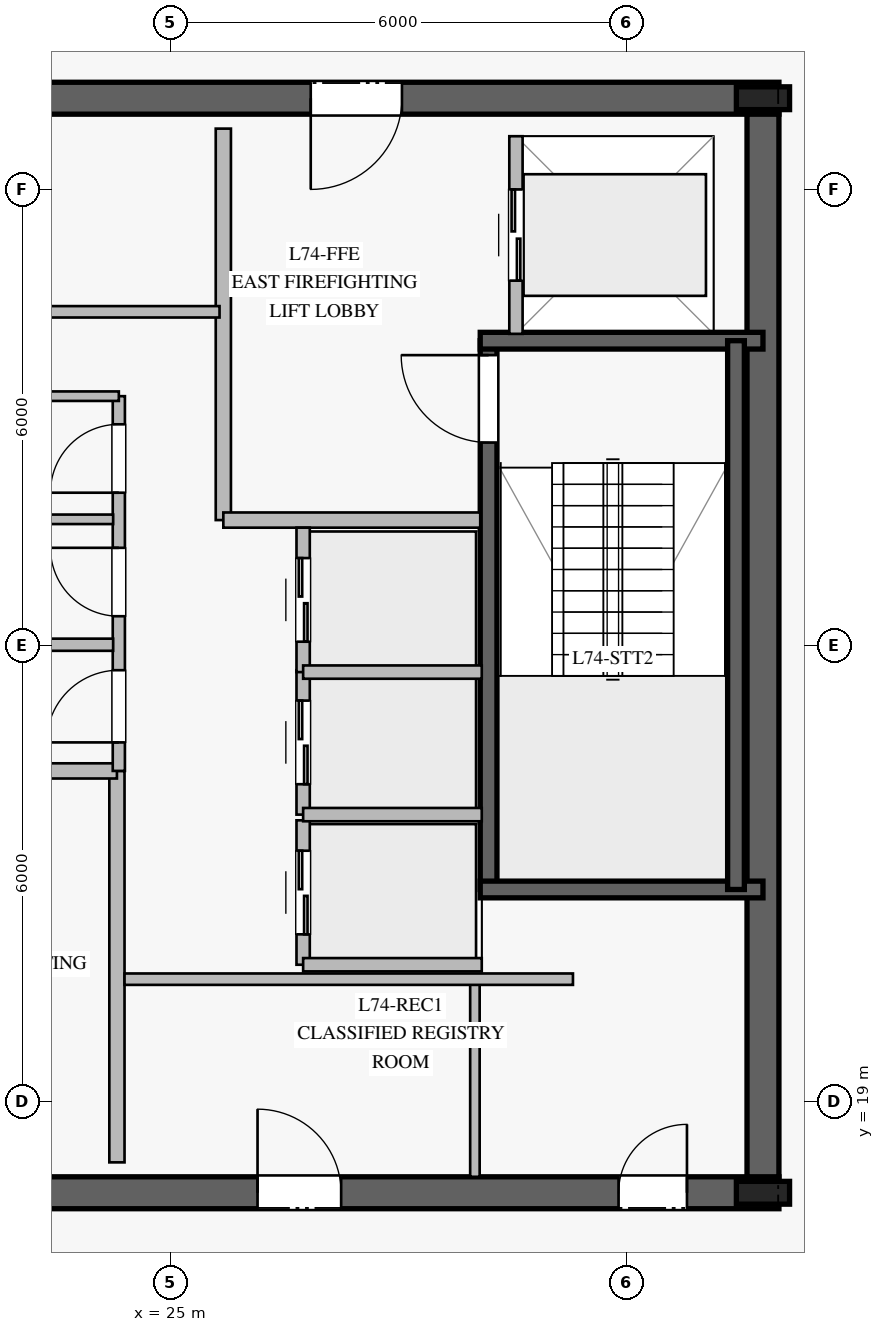
"""IFC4 building model, lengths in metres.
Left out: names, types, materials, properties, quantities, classifications, styles, units other than length and angle.
Written with IfcOpenShell. Run it as: python <this file> out.ifc"""

import sys

from ifc_helpers import new_model, si_unit, direction, frame, frame_2d, origin, origin_2d, place, context, subcontext, project, spatial, rectangle, i_section, extrude, element, fill, save


model = new_model("IFC4")
c1 = context("Model", 3, precision=1e-05, world=origin(), true_north=direction((0.0, 1.0)))
c2 = subcontext(c1, "Body", "Model", "MODEL_VIEW")
j1 = project(units=[si_unit("LENGTHUNIT", "METRE"), si_unit("PLANEANGLEUNIT", "RADIAN")], contexts=[c1])
p1 = place(None, origin())
s1 = spatial("IfcSite", under=j1, at=p1, CompositionType="ELEMENT")
p2 = place(p1, origin())
s2 = spatial("IfcBuilding", under=s1, at=p2, CompositionType="ELEMENT")
p3 = place(p2, frame((0.0, 0.0, 306.2)))
s3 = spatial("IfcBuildingStorey", under=s2, at=p3, CompositionType="ELEMENT", Elevation=306.2)
p4 = place(p3, frame((16.99, 17.8, 0.0), z_axis=(0.0, 0.0, 1.0), x_axis=(1.0, 0.0, 0.0)))
e1 = element("IfcWall", 1, at=p4, inside=s3, PredefinedType="SHEAR", context=c2, shape_type="SweptSolid", body=[
    extrude(rectangle(XDim=16.02, YDim=0.42, at=frame_2d((8.01, 0.0))), origin(), (0.0, 0.0, 1.0), 3.78),
])
p5 = place(p4, frame((4.96, 0.0, 0.0)))
e2 = element("IfcOpeningElement", 2, at=p5, cuts=e1, PredefinedType="OPENING", context=c2, shape_type="SweptSolid", body=[
    extrude(rectangle(XDim=1.2, YDim=2.25, at=frame_2d((0.6, 1.125))), frame((0.0, 0.22, 0.0), z_axis=(0.0, -1.0, 0.0), x_axis=(1.0, 0.0, 0.0)), (0.0, 0.0, 1.0), 0.44),
])
p6 = place(p4, frame((13.91, 0.0, 0.0)))
e3 = element("IfcOpeningElement", 3, at=p6, cuts=e1, PredefinedType="OPENING", context=c2, shape_type="SweptSolid", body=[
    extrude(rectangle(XDim=0.9, YDim=2.1, at=frame_2d((0.45, 1.05))), frame((0.0, 0.22, 0.0), z_axis=(0.0, -1.0, 0.0), x_axis=(1.0, 0.0, 0.0)), (0.0, 0.0, 1.0), 0.44),
])
p7 = place(p4, frame((9.16, 0.0, 0.0)))
e4 = element("IfcOpeningElement", 4, at=p7, cuts=e1, PredefinedType="OPENING", context=c2, shape_type="SweptSolid", body=[
    extrude(rectangle(XDim=1.1, YDim=2.2, at=frame_2d((0.55, 1.1))), frame((0.0, 0.22, 0.0), z_axis=(0.0, -1.0, 0.0), x_axis=(1.0, 0.0, 0.0)), (0.0, 0.0, 1.0), 0.44),
])
p8 = place(p3, frame((33.01, 32.2, 0.0), z_axis=(0.0, 0.0, 1.0), x_axis=(-1.0, 0.0, 0.0)))
e5 = element("IfcWall", 5, at=p8, inside=s3, PredefinedType="SHEAR", context=c2, shape_type="SweptSolid", body=[
    extrude(rectangle(XDim=16.02, YDim=0.42, at=frame_2d((8.01, 0.0))), origin(), (0.0, 0.0, 1.0), 3.78),
])
p9 = place(p8, frame((4.96, 0.0, 0.0)))
e6 = element("IfcOpeningElement", 6, at=p9, cuts=e5, PredefinedType="OPENING", context=c2, shape_type="SweptSolid", body=[
    extrude(rectangle(XDim=1.2, YDim=2.25, at=frame_2d((0.6, 1.125))), frame((0.0, 0.22, 0.0), z_axis=(0.0, -1.0, 0.0), x_axis=(1.0, 0.0, 0.0)), (0.0, 0.0, 1.0), 0.44),
])
p10 = place(p8, frame((9.785, 0.0, 0.0)))
e7 = element("IfcOpeningElement", 7, at=p10, cuts=e5, PredefinedType="OPENING", context=c2, shape_type="SweptSolid", body=[
    extrude(rectangle(XDim=1.1, YDim=2.2, at=frame_2d((0.55, 1.1))), frame((0.0, 0.22, 0.0), z_axis=(0.0, -1.0, 0.0), x_axis=(1.0, 0.0, 0.0)), (0.0, 0.0, 1.0), 0.44),
])
p11 = place(p3, frame((32.8, 18.01, 0.0), z_axis=(0.0, 0.0, 1.0), x_axis=(0.0, 1.0, 0.0)))
e8 = element("IfcWall", 8, at=p11, inside=s3, PredefinedType="SHEAR", context=c2, shape_type="SweptSolid", body=[
    extrude(rectangle(XDim=13.98, YDim=0.42, at=frame_2d((6.99, 0.0))), origin(), (0.0, 0.0, 1.0), 3.78),
])
for number, where, z_axis, x_axis in (
    (9, (32.8, 17.8, 0.0), (0.0, 0.0, 1.0), (1.0, 0.0, 0.0)),
    (10, (32.8, 32.2, 0.0), (0.0, 0.0, 1.0), (1.0, 0.0, 0.0)),
):
    element("IfcColumn", number, at=place(p3, frame(where, z_axis=z_axis, x_axis=x_axis)), inside=s3, PredefinedType="COLUMN", context=c2, shape_type="SweptSolid", body=[
        extrude(i_section(OverallWidth=0.3, OverallDepth=0.7, WebThickness=0.017, FlangeThickness=0.032, at=origin_2d()), origin(), (0.0, 0.0, 1.0), 4.0),
    ])
p12 = place(p3, frame((29.19, 21.79, 0.0), z_axis=(0.0, 0.0, 1.0), x_axis=(0.0, 1.0, 0.0)))
e11 = element("IfcWall", 11, at=p12, inside=s3, PredefinedType="SOLIDWALL", context=c2, shape_type="SweptSolid", body=[
    extrude(rectangle(XDim=7.22, YDim=0.22, at=frame_2d((3.61, 0.0))), origin(), (0.0, 0.0, 1.0), 3.78),
])
p13 = place(p12, frame((5.88, 0.0, 0.0)))
e12 = element("IfcOpeningElement", 12, at=p13, cuts=e11, PredefinedType="OPENING", context=c2, shape_type="SweptSolid", body=[
    extrude(rectangle(XDim=1.15, YDim=2.2, at=frame_2d((0.575, 1.1))), frame((0.0, 0.12, 0.0), z_axis=(0.0, -1.0, 0.0), x_axis=(1.0, 0.0, 0.0)), (0.0, 0.0, 1.0), 0.24),
])
for number, where, z_axis, x_axis in (
    (13, (29.08, 21.79, 0.0), (0.0, 0.0, 1.0), (1.0, 0.0, 0.0)),
    (14, (29.08, 29.01, 0.0), (0.0, 0.0, 1.0), (1.0, 0.0, 0.0)),
):
    element("IfcWall", number, at=place(p3, frame(where, z_axis=z_axis, x_axis=x_axis)), inside=s3, PredefinedType="SOLIDWALL", context=c2, shape_type="SweptSolid", body=[
        extrude(rectangle(XDim=3.72, YDim=0.22, at=frame_2d((1.86, 0.0))), origin(), (0.0, 0.0, 1.0), 3.78),
    ])
p14 = place(p3, frame((32.445, 29.01, 0.0), z_axis=(0.0, 0.0, 1.0), x_axis=(0.0, -1.0, 0.0)))
e15 = element("IfcWall", 15, at=p14, inside=s3, PredefinedType="SOLIDWALL", context=c2, shape_type="SweptSolid", body=[
    extrude(rectangle(XDim=7.22, YDim=0.22, at=frame_2d((3.61, 0.0))), origin(), (0.0, 0.0, 1.0), 3.78),
])
p15 = place(p3, frame((24.3, 18.2, 0.0), z_axis=(0.0, 0.0, 1.0), x_axis=(0.0, 1.0, 0.0)))
e16 = element("IfcWall", 16, at=p15, inside=s3, PredefinedType="PARTITIONING", context=c2, shape_type="SweptSolid", body=[
    extrude(rectangle(XDim=5.15, YDim=0.2, at=frame_2d((2.575, 0.0))), origin(), (0.0, 0.0, 1.0), 3.78),
])
p16 = place(p3, frame((20.92, 23.35, 0.0), z_axis=(0.0, 0.0, 1.0), x_axis=(1.0, 0.0, 0.0)))
e17 = element("IfcWall", 17, at=p16, inside=s3, PredefinedType="PARTITIONING", context=c2, shape_type="SweptSolid", body=[
    extrude(rectangle(XDim=3.38, YDim=0.2, at=frame_2d((1.69, 0.0))), origin(), (0.0, 0.0, 1.0), 3.78),
])
p17 = place(p3, frame((25.7, 26.65, 0.0), z_axis=(0.0, 0.0, 1.0), x_axis=(0.0, 1.0, 0.0)))
e18 = element("IfcWall", 18, at=p17, inside=s3, PredefinedType="PARTITIONING", context=c2, shape_type="SweptSolid", body=[
    extrude(rectangle(XDim=5.15, YDim=0.2, at=frame_2d((2.575, 0.0))), origin(), (0.0, 0.0, 1.0), 3.78),
])
p18 = place(p3, frame((25.7, 26.65, 0.0), z_axis=(0.0, 0.0, 1.0), x_axis=(1.0, 0.0, 0.0)))
e19 = element("IfcWall", 19, at=p18, inside=s3, PredefinedType="PARTITIONING", context=c2, shape_type="SweptSolid", body=[
    extrude(rectangle(XDim=3.38, YDim=0.2, at=frame_2d((1.69, 0.0))), origin(), (0.0, 0.0, 1.0), 3.78),
])
p19 = place(p3, frame((24.325, 23.35, 0.0), z_axis=(0.0, 0.0, 1.0), x_axis=(0.0, 1.0, 0.0)))
e20 = element("IfcWall", 20, at=p19, inside=s3, PredefinedType="PLUMBINGWALL", context=c2, shape_type="SweptSolid", body=[
    extrude(rectangle(XDim=4.93, YDim=0.16, at=frame_2d((2.465, 0.0))), origin(), (0.0, 0.0, 1.0), 3.78),
])
p20 = place(p19, frame((0.375, 0.0, 0.0)))
e21 = element("IfcOpeningElement", 21, at=p20, cuts=e20, PredefinedType="OPENING", context=c2, shape_type="SweptSolid", body=[
    extrude(rectangle(XDim=0.95, YDim=2.1, at=frame_2d((0.475, 1.05))), frame((0.0, 0.09, 0.0), z_axis=(0.0, -1.0, 0.0), x_axis=(1.0, 0.0, 0.0)), (0.0, 0.0, 1.0), 0.18),
])
p21 = place(p19, frame((2.035, 0.0, 0.0)))
e22 = element("IfcOpeningElement", 22, at=p21, cuts=e20, PredefinedType="OPENING", context=c2, shape_type="SweptSolid", body=[
    extrude(rectangle(XDim=0.9, YDim=2.1, at=frame_2d((0.45, 1.05))), frame((0.0, 0.09, 0.0), z_axis=(0.0, -1.0, 0.0), x_axis=(1.0, 0.0, 0.0)), (0.0, 0.0, 1.0), 0.18),
])
p22 = place(p19, frame((3.66, 0.0, 0.0)))
e23 = element("IfcOpeningElement", 23, at=p22, cuts=e20, PredefinedType="OPENING", context=c2, shape_type="SweptSolid", body=[
    extrude(rectangle(XDim=0.9, YDim=2.1, at=frame_2d((0.45, 1.05))), frame((0.0, 0.09, 0.0), z_axis=(0.0, -1.0, 0.0), x_axis=(1.0, 0.0, 0.0)), (0.0, 0.0, 1.0), 0.18),
])
p23 = place(p3, frame((20.92, 28.28, 0.0), z_axis=(0.0, 0.0, 1.0), x_axis=(1.0, 0.0, 0.0)))
e24 = element("IfcWall", 24, at=p23, inside=s3, PredefinedType="PARTITIONING", context=c2, shape_type="SweptSolid", body=[
    extrude(rectangle(XDim=3.405, YDim=0.125, at=frame_2d((1.703, 0.0))), origin(), (0.0, 0.0, 1.0), 3.78),
])
p24 = place(p3, frame((29.01, 18.01, 0.0), z_axis=(0.0, 0.0, 1.0), x_axis=(0.0, 1.0, 0.0)))
e25 = element("IfcWall", 25, at=p24, inside=s3, PredefinedType="PARTITIONING", context=c2, shape_type="SweptSolid", body=[
    extrude(rectangle(XDim=2.54, YDim=0.125, at=frame_2d((1.27, 0.0))), origin(), (0.0, 0.0, 1.0), 3.78),
])
p25 = place(p3, frame((20.95, 25.01, 0.0), z_axis=(0.0, 0.0, 1.0), x_axis=(1.0, 0.0, 0.0)))
e26 = element("IfcWall", 26, at=p25, inside=s3, PredefinedType="PLUMBINGWALL", context=c2, shape_type="SweptSolid", body=[
    extrude(rectangle(XDim=3.3, YDim=0.16, at=frame_2d((1.65, 0.0))), origin(), (0.0, 0.0, 1.0), 3.78),
])
p26 = place(p3, frame((20.95, 26.66, 0.0), z_axis=(0.0, 0.0, 1.0), x_axis=(1.0, 0.0, 0.0)))
e27 = element("IfcWall", 27, at=p26, inside=s3, PredefinedType="PARTITIONING", context=c2, shape_type="SweptSolid", body=[
    extrude(rectangle(XDim=3.3, YDim=0.125, at=frame_2d((1.65, 0.0))), origin(), (0.0, 0.0, 1.0), 3.78),
])
p27 = place(p3, frame((24.4, 20.61, 0.0), z_axis=(0.0, 0.0, 1.0), x_axis=(1.0, 0.0, 0.0)))
e28 = element("IfcWall", 28, at=p27, inside=s3, PredefinedType="PARTITIONING", context=c2, shape_type="SweptSolid", body=[
    extrude(rectangle(XDim=5.9, YDim=0.15, at=frame_2d((2.95, 0.0))), origin(), (0.0, 0.0, 1.0), 3.78),
])
p28 = place(p3, frame((19.75, 29.39, 0.0), z_axis=(0.0, 0.0, 1.0), x_axis=(1.0, 0.0, 0.0)))
e29 = element("IfcWall", 29, at=p28, inside=s3, PredefinedType="PARTITIONING", context=c2, shape_type="SweptSolid", body=[
    extrude(rectangle(XDim=5.9, YDim=0.15, at=frame_2d((2.95, 0.0))), origin(), (0.0, 0.0, 1.0), 3.78),
])
p29 = place(p3, frame((26.75, 20.8, 0.0), z_axis=(0.0, 0.0, 1.0), x_axis=(0.0, 1.0, 0.0)))
e30 = element("IfcWall", 30, at=p29, inside=s3, PredefinedType="PARTITIONING", context=c2, shape_type="SweptSolid", body=[
    extrude(rectangle(XDim=1.9, YDim=0.175, at=frame_2d((0.95, 0.0))), origin(), (0.0, 0.0, 1.0), 3.78),
])
p30 = place(p29, frame((0.4, 0.0, 0.0)))
e31 = element("IfcOpeningElement", 31, at=p30, cuts=e30, PredefinedType="OPENING", context=c2, shape_type="SweptSolid", body=[
    extrude(rectangle(XDim=1.1, YDim=2.2, at=frame_2d((0.55, 1.1))), frame((0.0, 0.098, 0.0), z_axis=(0.0, -1.0, 0.0), x_axis=(1.0, 0.0, 0.0)), (0.0, 0.0, 1.0), 0.195),
])
p31 = place(p3, frame((26.75, 20.8, 0.0), z_axis=(0.0, 0.0, 1.0), x_axis=(1.0, 0.0, 0.0)))
e32 = element("IfcWall", 32, at=p31, inside=s3, PredefinedType="PARTITIONING", context=c2, shape_type="SweptSolid", body=[
    extrude(rectangle(XDim=2.35, YDim=0.175, at=frame_2d((1.175, 0.0))), origin(), (0.0, 0.0, 1.0), 3.78),
])
p32 = place(p3, frame((26.75, 22.775, 0.0), z_axis=(0.0, 0.0, 1.0), x_axis=(0.0, 1.0, 0.0)))
e33 = element("IfcWall", 33, at=p32, inside=s3, PredefinedType="PARTITIONING", context=c2, shape_type="SweptSolid", body=[
    extrude(rectangle(XDim=1.9, YDim=0.175, at=frame_2d((0.95, 0.0))), origin(), (0.0, 0.0, 1.0), 3.78),
])
p33 = place(p32, frame((0.4, 0.0, 0.0)))
e34 = element("IfcOpeningElement", 34, at=p33, cuts=e33, PredefinedType="OPENING", context=c2, shape_type="SweptSolid", body=[
    extrude(rectangle(XDim=1.1, YDim=2.2, at=frame_2d((0.55, 1.1))), frame((0.0, 0.098, 0.0), z_axis=(0.0, -1.0, 0.0), x_axis=(1.0, 0.0, 0.0)), (0.0, 0.0, 1.0), 0.195),
])
p34 = place(p3, frame((26.75, 22.775, 0.0), z_axis=(0.0, 0.0, 1.0), x_axis=(1.0, 0.0, 0.0)))
e35 = element("IfcWall", 35, at=p34, inside=s3, PredefinedType="PARTITIONING", context=c2, shape_type="SweptSolid", body=[
    extrude(rectangle(XDim=2.35, YDim=0.175, at=frame_2d((1.175, 0.0))), origin(), (0.0, 0.0, 1.0), 3.78),
])
p35 = place(p3, frame((26.75, 24.65, 0.0), z_axis=(0.0, 0.0, 1.0), x_axis=(0.0, 1.0, 0.0)))
e36 = element("IfcWall", 36, at=p35, inside=s3, PredefinedType="PARTITIONING", context=c2, shape_type="SweptSolid", body=[
    extrude(rectangle(XDim=1.9, YDim=0.175, at=frame_2d((0.95, 0.0))), origin(), (0.0, 0.0, 1.0), 3.78),
])
p36 = place(p35, frame((0.4, 0.0, 0.0)))
e37 = element("IfcOpeningElement", 37, at=p36, cuts=e36, PredefinedType="OPENING", context=c2, shape_type="SweptSolid", body=[
    extrude(rectangle(XDim=1.1, YDim=2.2, at=frame_2d((0.55, 1.1))), frame((0.0, 0.098, 0.0), z_axis=(0.0, -1.0, 0.0), x_axis=(1.0, 0.0, 0.0)), (0.0, 0.0, 1.0), 0.195),
])
p37 = place(p3, frame((26.75, 24.65, 0.0), z_axis=(0.0, 0.0, 1.0), x_axis=(1.0, 0.0, 0.0)))
e38 = element("IfcWall", 38, at=p37, inside=s3, PredefinedType="PARTITIONING", context=c2, shape_type="SweptSolid", body=[
    extrude(rectangle(XDim=2.35, YDim=0.175, at=frame_2d((1.175, 0.0))), origin(), (0.0, 0.0, 1.0), 3.78),
])
p38 = place(p3, frame((29.55, 29.1, 0.0), z_axis=(0.0, 0.0, 1.0), x_axis=(0.0, 1.0, 0.0)))
e39 = element("IfcWall", 39, at=p38, inside=s3, PredefinedType="PARTITIONING", context=c2, shape_type="SweptSolid", body=[
    extrude(rectangle(XDim=2.6, YDim=0.175, at=frame_2d((1.3, 0.0))), origin(), (0.0, 0.0, 1.0), 3.78),
])
p39 = place(p38, frame((0.7, 0.0, 0.0)))
e40 = element("IfcOpeningElement", 40, at=p39, cuts=e39, PredefinedType="OPENING", context=c2, shape_type="SweptSolid", body=[
    extrude(rectangle(XDim=1.2, YDim=2.2, at=frame_2d((0.6, 1.1))), frame((0.0, 0.098, 0.0), z_axis=(0.0, -1.0, 0.0), x_axis=(1.0, 0.0, 0.0)), (0.0, 0.0, 1.0), 0.195),
])
p40 = place(p13, origin())
e41 = element("IfcDoor", 41, at=p40, inside=s3, OperationType="SINGLE_SWING_RIGHT", PredefinedType="DOOR", context=c2, shape_type="SweptSolid", body=[
    extrude(rectangle(XDim=1.15, YDim=2.2, at=frame_2d((0.575, 1.1))), frame((0.0, 0.025, 0.0), z_axis=(0.0, -1.0, 0.0), x_axis=(1.0, 0.0, 0.0)), (0.0, 0.0, 1.0), 0.05),
])
fill(e12, e41)
p41 = place(p9, origin())
e42 = element("IfcDoor", 42, at=p41, inside=s3, OperationType="SINGLE_SWING_RIGHT", PredefinedType="DOOR", context=c2, shape_type="SweptSolid", body=[
    extrude(rectangle(XDim=1.2, YDim=2.25, at=frame_2d((0.6, 1.125))), frame((0.0, 0.025, 0.0), z_axis=(0.0, -1.0, 0.0), x_axis=(1.0, 0.0, 0.0)), (0.0, 0.0, 1.0), 0.05),
])
fill(e6, e42)
p42 = place(p20, origin())
e43 = element("IfcDoor", 43, at=p42, inside=s3, OperationType="SINGLE_SWING_LEFT", PredefinedType="DOOR", context=c2, shape_type="SweptSolid", body=[
    extrude(rectangle(XDim=0.95, YDim=2.1, at=frame_2d((0.475, 1.05))), frame((0.0, 0.025, 0.0), z_axis=(0.0, -1.0, 0.0), x_axis=(1.0, 0.0, 0.0)), (0.0, 0.0, 1.0), 0.05),
])
fill(e21, e43)
p43 = place(p21, origin())
e44 = element("IfcDoor", 44, at=p43, inside=s3, OperationType="SINGLE_SWING_RIGHT", PredefinedType="DOOR", context=c2, shape_type="SweptSolid", body=[
    extrude(rectangle(XDim=0.9, YDim=2.1, at=frame_2d((0.45, 1.05))), frame((0.0, 0.025, 0.0), z_axis=(0.0, -1.0, 0.0), x_axis=(1.0, 0.0, 0.0)), (0.0, 0.0, 1.0), 0.05),
])
fill(e22, e44)
p44 = place(p22, origin())
e45 = element("IfcDoor", 45, at=p44, inside=s3, OperationType="SINGLE_SWING_LEFT", PredefinedType="DOOR", context=c2, shape_type="SweptSolid", body=[
    extrude(rectangle(XDim=0.9, YDim=2.1, at=frame_2d((0.45, 1.05))), frame((0.0, 0.025, 0.0), z_axis=(0.0, -1.0, 0.0), x_axis=(1.0, 0.0, 0.0)), (0.0, 0.0, 1.0), 0.05),
])
fill(e23, e45)
p45 = place(p6, origin())
e46 = element("IfcDoor", 46, at=p45, inside=s3, OperationType="SINGLE_SWING_RIGHT", PredefinedType="DOOR", context=c2, shape_type="SweptSolid", body=[
    extrude(rectangle(XDim=0.9, YDim=2.1, at=frame_2d((0.45, 1.05))), frame((0.0, 0.025, 0.0), z_axis=(0.0, -1.0, 0.0), x_axis=(1.0, 0.0, 0.0)), (0.0, 0.0, 1.0), 0.05),
])
fill(e3, e46)
p46 = place(p7, origin())
e47 = element("IfcDoor", 47, at=p46, inside=s3, OperationType="SINGLE_SWING_LEFT", PredefinedType="DOOR", context=c2, shape_type="SweptSolid", body=[
    extrude(rectangle(XDim=1.1, YDim=2.2, at=frame_2d((0.55, 1.1))), frame((0.0, 0.025, 0.0), z_axis=(0.0, -1.0, 0.0), x_axis=(1.0, 0.0, 0.0)), (0.0, 0.0, 1.0), 0.05),
])
fill(e4, e47)
p47 = place(p30, origin())
e48 = element("IfcDoor", 48, at=p47, inside=s3, OperationType="DOUBLE_DOOR_SLIDING", PredefinedType="DOOR", context=c2, shape_type="SweptSolid", body=[
    extrude(rectangle(XDim=1.1, YDim=2.2, at=frame_2d((0.55, 1.1))), frame((0.0, 0.025, 0.0), z_axis=(0.0, -1.0, 0.0), x_axis=(1.0, 0.0, 0.0)), (0.0, 0.0, 1.0), 0.05),
])
fill(e31, e48)
p48 = place(p33, origin())
e49 = element("IfcDoor", 49, at=p48, inside=s3, OperationType="DOUBLE_DOOR_SLIDING", PredefinedType="DOOR", context=c2, shape_type="SweptSolid", body=[
    extrude(rectangle(XDim=1.1, YDim=2.2, at=frame_2d((0.55, 1.1))), frame((0.0, 0.025, 0.0), z_axis=(0.0, -1.0, 0.0), x_axis=(1.0, 0.0, 0.0)), (0.0, 0.0, 1.0), 0.05),
])
fill(e34, e49)
p49 = place(p36, origin())
e50 = element("IfcDoor", 50, at=p49, inside=s3, OperationType="DOUBLE_DOOR_SLIDING", PredefinedType="DOOR", context=c2, shape_type="SweptSolid", body=[
    extrude(rectangle(XDim=1.1, YDim=2.2, at=frame_2d((0.55, 1.1))), frame((0.0, 0.025, 0.0), z_axis=(0.0, -1.0, 0.0), x_axis=(1.0, 0.0, 0.0)), (0.0, 0.0, 1.0), 0.05),
])
fill(e37, e50)
p50 = place(p39, origin())
e51 = element("IfcDoor", 51, at=p50, inside=s3, OperationType="DOUBLE_DOOR_SLIDING", PredefinedType="DOOR", context=c2, shape_type="SweptSolid", body=[
    extrude(rectangle(XDim=1.2, YDim=2.2, at=frame_2d((0.6, 1.1))), frame((0.0, 0.025, 0.0), z_axis=(0.0, -1.0, 0.0), x_axis=(1.0, 0.0, 0.0)), (0.0, 0.0, 1.0), 0.05),
])
fill(e40, e51)
save(model, sys.argv[1])
